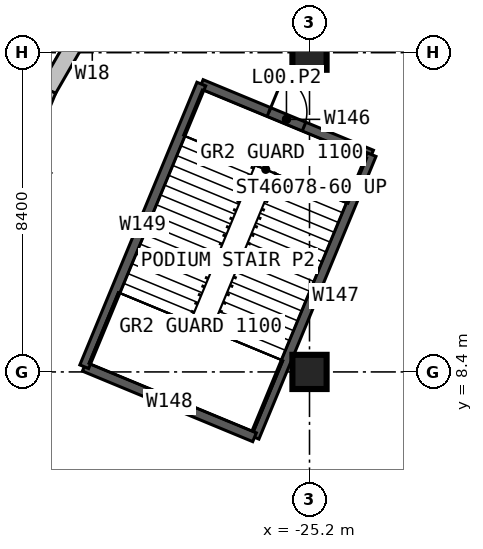
"""IFC4 building model, lengths in metres.
Left out: names, types, materials, properties, quantities, classifications, styles, units other than length and angle.
Written with IfcOpenShell. Run it as: python <this file> out.ifc"""

import sys

from ifc_helpers import new_model, si_unit, direction, frame, frame_2d, origin, origin_2d, place, context, subcontext, project, spatial, rectangle, extrude, element, fill, save


model = new_model("IFC4")
c1 = context("Model", 3, precision=1e-05, world=origin(), true_north=direction((0.0, 1.0)))
c2 = subcontext(c1, "Body", "Model", "MODEL_VIEW")
j1 = project(units=[si_unit("LENGTHUNIT", "METRE"), si_unit("PLANEANGLEUNIT", "RADIAN")], contexts=[c1])
p1 = place(None, origin())
s1 = spatial("IfcSite", under=j1, at=p1, CompositionType="ELEMENT")
p2 = place(p1, origin())
s2 = spatial("IfcBuilding", under=s1, at=p2, CompositionType="ELEMENT")
p3 = place(p2, origin())
s3 = spatial("IfcBuildingStorey", under=s2, at=p3, CompositionType="ELEMENT", Elevation=0.0)
for number, where, z_axis, x_axis in (
    (1, (-25.2, 8.4, 0.0), (0.0, 0.0, 1.0), (1.0, 0.0, 0.0)),
    (2, (-25.2, 16.8, 0.0), (0.0, 0.0, 1.0), (1.0, 0.0, 0.0)),
    (3, (-32.521, 13.47, 0.0), (0.0, 0.0, 1.0), (-0.924, 0.383, 0.0)),
):
    element("IfcColumn", number, at=place(p3, frame(where, z_axis=z_axis, x_axis=x_axis)), inside=s3, PredefinedType="COLUMN", context=c2, shape_type="SweptSolid", body=[
        extrude(rectangle(XDim=0.9, YDim=0.9, at=origin_2d()), origin(), (0.0, 0.0, 1.0), 6.0),
    ])
p4 = place(p3, frame((-29.746, 19.875, 0.0), z_axis=(0.0, 0.0, 1.0), x_axis=(-0.500022025083, -0.866012687223, 0.0)))
e4 = element("IfcWall", 4, at=p4, inside=s3, PredefinedType="SOLIDWALL", context=c2, shape_type="SweptSolid", body=[
    extrude(rectangle(XDim=4.679, YDim=0.45, at=frame_2d((2.34, 0.0))), origin(), (0.0, 0.0, 1.0), 5.7),
])
p5 = place(p4, frame((1.34, 0.0, 0.0)))
e5 = element("IfcOpeningElement", 5, at=p5, cuts=e4, PredefinedType="OPENING", context=c2, shape_type="SweptSolid", body=[
    extrude(rectangle(XDim=2.0, YDim=3.0, at=frame_2d((1.0, 1.5))), frame((0.0, 0.235, 0.0), z_axis=(0.0, -1.0, 0.0), x_axis=(1.0, 0.0, 0.0)), (0.0, 0.0, 1.0), 0.47),
])
p6 = place(p3, frame((-32.086, 15.823, 0.0), z_axis=(0.0, 0.0, 1.0), x_axis=(-0.382669718086, -0.923885213032, 0.0)))
e6 = element("IfcWall", 6, at=p6, inside=s3, PredefinedType="SOLIDWALL", context=c2, shape_type="SweptSolid", body=[
    extrude(rectangle(XDim=4.68, YDim=0.45, at=frame_2d((2.34, 0.0))), origin(), (0.0, 0.0, 1.0), 5.7),
])
p7 = place(p6, frame((1.44, 0.0, 0.9)))
e7 = element("IfcOpeningElement", 7, at=p7, cuts=e6, PredefinedType="OPENING", context=c2, shape_type="SweptSolid", body=[
    extrude(rectangle(XDim=1.8, YDim=3.6, at=frame_2d((0.9, 1.8))), frame((0.0, 0.235, 0.0), z_axis=(0.0, -1.0, 0.0), x_axis=(1.0, 0.0, 0.0)), (0.0, 0.0, 1.0), 0.47),
])
p8 = place(p3, frame((-28.047, 15.974, 0.0), z_axis=(0.0, 0.0, 1.0), x_axis=(0.923862828997, -0.382723755727, 0.0)))
e8 = element("IfcWall", 8, at=p8, inside=s3, PredefinedType="SOLIDWALL", context=c2, shape_type="SweptSolid", body=[
    extrude(rectangle(XDim=4.85, YDim=0.25, at=frame_2d((2.425, 0.0))), origin(), (0.0, 0.0, 1.0), 6.0),
])
p9 = place(p8, frame((1.925, 0.0, 0.0)))
e9 = element("IfcOpeningElement", 9, at=p9, cuts=e8, PredefinedType="OPENING", context=c2, shape_type="SweptSolid", body=[
    extrude(rectangle(XDim=1.0, YDim=2.2, at=frame_2d((0.5, 1.1))), frame((0.0, 0.135, 0.0), z_axis=(0.0, -1.0, 0.0), x_axis=(1.0, 0.0, 0.0)), (0.0, 0.0, 1.0), 0.27),
])
p10 = place(p3, frame((-23.566, 14.118, 0.0), z_axis=(0.0, 0.0, 1.0), x_axis=(-0.382689294869, -0.923877104161, 0.0)))
e10 = element("IfcWall", 10, at=p10, inside=s3, PredefinedType="SOLIDWALL", context=c2, shape_type="SweptSolid", body=[
    extrude(rectangle(XDim=8.05, YDim=0.25, at=frame_2d((4.025, 0.0))), origin(), (0.0, 0.0, 1.0), 6.0),
])
p11 = place(p3, frame((-26.647, 6.681, 0.0), z_axis=(0.0, 0.0, 1.0), x_axis=(-0.923880627248, 0.382680789426, 0.0)))
e11 = element("IfcWall", 11, at=p11, inside=s3, PredefinedType="SOLIDWALL", context=c2, shape_type="SweptSolid", body=[
    extrude(rectangle(XDim=4.85, YDim=0.25, at=frame_2d((2.425, 0.0))), origin(), (0.0, 0.0, 1.0), 6.0),
])
p12 = place(p3, frame((-31.127, 8.537, 0.0), z_axis=(0.0, 0.0, 1.0), x_axis=(0.382678572144, 0.923881545666, 0.0)))
e12 = element("IfcWall", 12, at=p12, inside=s3, PredefinedType="SOLIDWALL", context=c2, shape_type="SweptSolid", body=[
    extrude(rectangle(XDim=8.05, YDim=0.25, at=frame_2d((4.025, 0.0))), origin(), (0.0, 0.0, 1.0), 6.0),
])
p13 = place(p3, frame((-25.12, 25.12, 0.0), z_axis=(0.0, 0.0, 1.0), x_axis=(0.707106781187, -0.707106781187, 0.0)))
e13 = element("IfcWall", 13, at=p13, inside=s3, PredefinedType="PARTITIONING", context=c2, shape_type="SweptSolid", body=[
    extrude(rectangle(XDim=15.528, YDim=0.2, at=frame_2d((7.764, 0.0))), origin(), (0.0, 0.0, 1.0), 5.7),
])
p14 = place(p9, origin())
e14 = element("IfcDoor", 14, at=p14, inside=s3, OperationType="SINGLE_SWING_LEFT", PredefinedType="DOOR", context=c2, shape_type="SweptSolid", body=[
    extrude(rectangle(XDim=1.0, YDim=2.2, at=frame_2d((0.5, 1.1))), frame((0.0, 0.025, 0.0), z_axis=(0.0, -1.0, 0.0), x_axis=(1.0, 0.0, 0.0)), (0.0, 0.0, 1.0), 0.05),
])
fill(e9, e14)
save(model, sys.argv[1])
